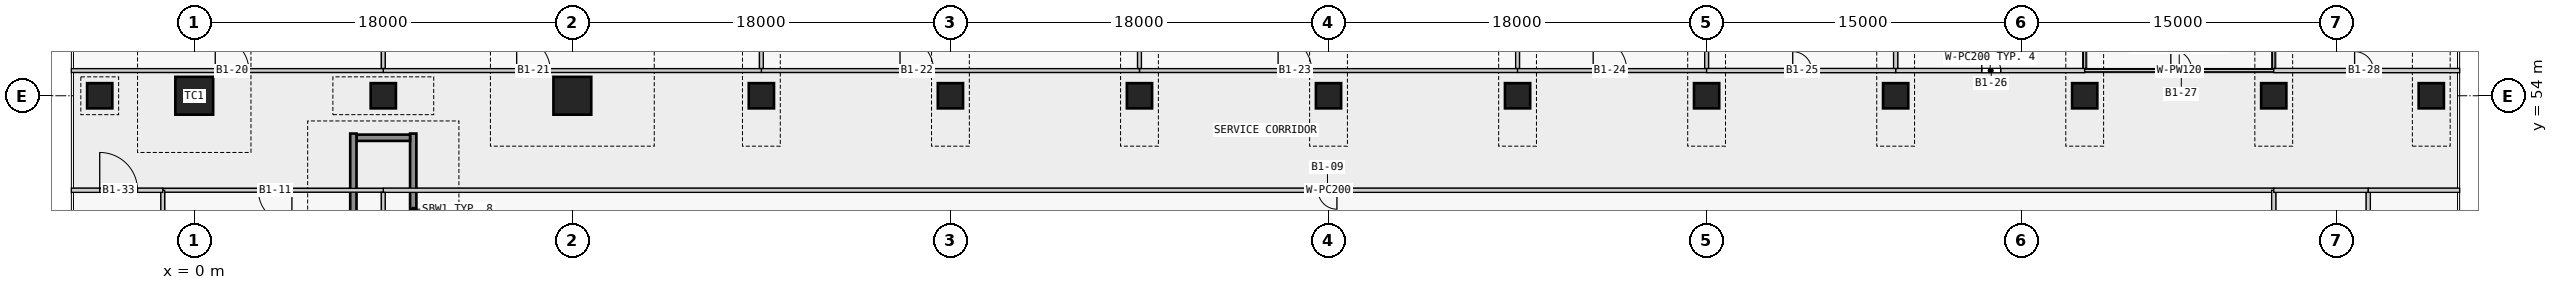
"""IFC4 building model, lengths in metres.
Left out: names, types, materials, properties, quantities, classifications, styles, units other than length and angle.
Written with IfcOpenShell. Run it as: python <this file> out.ifc"""

import sys

from ifc_helpers import new_model, si_unit, direction, frame, frame_2d, origin, origin_2d, place, context, subcontext, project, spatial, rectangle, extrude, element, fill, save


model = new_model("IFC4")
c1 = context("Model", 3, precision=1e-05, world=origin(), true_north=direction((0.0, 1.0)))
c2 = subcontext(c1, "Body", "Model", "MODEL_VIEW")
j1 = project(units=[si_unit("LENGTHUNIT", "METRE"), si_unit("PLANEANGLEUNIT", "RADIAN")], contexts=[c1])
p1 = place(None, origin())
s1 = spatial("IfcSite", under=j1, at=p1, CompositionType="ELEMENT")
p2 = place(p1, origin())
s2 = spatial("IfcBuilding", under=s1, at=p2, CompositionType="ELEMENT")
p3 = place(p2, frame((0.0, 0.0, -7.0)))
s3 = spatial("IfcBuildingStorey", under=s2, at=p3, CompositionType="ELEMENT", Elevation=-7.0)
p4 = place(p3, frame((-4.5, 54.0, 0.0), z_axis=(0.0, 0.0, 1.0), x_axis=(1.0, 0.0, 0.0)))
e1 = element("IfcColumn", 1, at=p4, inside=s3, PredefinedType="COLUMN", context=c2, shape_type="SweptSolid", body=[
    extrude(rectangle(XDim=1.2, YDim=1.2, at=origin_2d()), origin(), (0.0, 0.0, 1.0), 7.0),
])
p5 = place(p3, frame((0.0, 54.0, 0.0), z_axis=(0.0, 0.0, 1.0), x_axis=(1.0, 0.0, 0.0)))
e2 = element("IfcColumn", 2, at=p5, inside=s3, PredefinedType="COLUMN", context=c2, shape_type="SweptSolid", body=[
    extrude(rectangle(XDim=1.8, YDim=1.8, at=origin_2d()), origin(), (0.0, 0.0, 1.0), 7.0),
])
p6 = place(p3, frame((9.0, 54.0, 0.0), z_axis=(0.0, 0.0, 1.0), x_axis=(1.0, 0.0, 0.0)))
e3 = element("IfcColumn", 3, at=p6, inside=s3, PredefinedType="COLUMN", context=c2, shape_type="SweptSolid", body=[
    extrude(rectangle(XDim=1.2, YDim=1.2, at=origin_2d()), origin(), (0.0, 0.0, 1.0), 7.0),
])
p7 = place(p3, frame((18.0, 54.0, 0.0), z_axis=(0.0, 0.0, 1.0), x_axis=(1.0, 0.0, 0.0)))
e4 = element("IfcColumn", 4, at=p7, inside=s3, PredefinedType="COLUMN", context=c2, shape_type="SweptSolid", body=[
    extrude(rectangle(XDim=1.8, YDim=1.8, at=origin_2d()), origin(), (0.0, 0.0, 1.0), 7.0),
])
for number, where, z_axis, x_axis in (
    (5, (27.0, 54.0, 0.0), (0.0, 0.0, 1.0), (1.0, 0.0, 0.0)),
    (6, (36.0, 54.0, 0.0), (0.0, 0.0, 1.0), (1.0, 0.0, 0.0)),
    (7, (45.0, 54.0, 0.0), (0.0, 0.0, 1.0), (1.0, 0.0, 0.0)),
    (8, (54.0, 54.0, 0.0), (0.0, 0.0, 1.0), (1.0, 0.0, 0.0)),
    (9, (63.0, 54.0, 0.0), (0.0, 0.0, 1.0), (1.0, 0.0, 0.0)),
    (10, (72.0, 54.0, 0.0), (0.0, 0.0, 1.0), (1.0, 0.0, 0.0)),
    (11, (81.0, 54.0, 0.0), (0.0, 0.0, 1.0), (1.0, 0.0, 0.0)),
    (12, (90.0, 54.0, 0.0), (0.0, 0.0, 1.0), (1.0, 0.0, 0.0)),
    (13, (99.0, 54.0, 0.0), (0.0, 0.0, 1.0), (1.0, 0.0, 0.0)),
    (14, (106.5, 54.0, 0.0), (0.0, 0.0, 1.0), (1.0, 0.0, 0.0)),
):
    element("IfcColumn", number, at=place(p3, frame(where, z_axis=z_axis, x_axis=x_axis)), inside=s3, PredefinedType="COLUMN", context=c2, shape_type="SweptSolid", body=[
        extrude(rectangle(XDim=1.2, YDim=1.2, at=origin_2d()), origin(), (0.0, 0.0, 1.0), 7.0),
    ])
p8 = place(p3, frame((7.725, 52.0, 0.0), z_axis=(0.0, 0.0, 1.0), x_axis=(1.0, 0.0, 0.0)))
e15 = element("IfcWall", 15, at=p8, inside=s3, PredefinedType="SHEAR", context=c2, shape_type="SweptSolid", body=[
    extrude(rectangle(XDim=2.55, YDim=0.3, at=frame_2d((1.275, 0.0))), origin(), (0.0, 0.0, 1.0), 6.55),
])
for number, where, z_axis, x_axis in (
    (16, (7.575, 45.0, 0.0), (0.0, 0.0, 1.0), (0.0, 1.0, 0.0)),
    (17, (10.425, 45.0, 0.0), (0.0, 0.0, 1.0), (0.0, 1.0, 0.0)),
):
    element("IfcWall", number, at=place(p3, frame(where, z_axis=z_axis, x_axis=x_axis)), inside=s3, PredefinedType="SHEAR", context=c2, shape_type="SweptSolid", body=[
        extrude(rectangle(XDim=7.2, YDim=0.3, at=frame_2d((3.6, 0.0))), origin(), (0.0, 0.0, 1.0), 6.55),
    ])
p9 = place(p3, frame((99.0, 49.5, 0.0), z_axis=(0.0, 0.0, 1.0), x_axis=(-1.0, 0.0, 0.0)))
e18 = element("IfcWall", 18, at=p9, inside=s3, PredefinedType="PARTITIONING", context=c2, shape_type="SweptSolid", body=[
    extrude(rectangle(XDim=90.0, YDim=0.2, at=frame_2d((45.0, 0.0))), origin(), (0.0, 0.0, 1.0), 6.55),
])
p10 = place(p9, frame((44.6, 0.0, 0.0)))
e19 = element("IfcOpeningElement", 19, at=p10, cuts=e18, PredefinedType="OPENING", context=c2, shape_type="SweptSolid", body=[
    extrude(rectangle(XDim=0.9, YDim=2.1, at=frame_2d((0.45, 1.05))), frame((0.0, 0.11, 0.0), z_axis=(0.0, -1.0, 0.0), x_axis=(1.0, 0.0, 0.0)), (0.0, 0.0, 1.0), 0.22),
])
p11 = place(p3, frame((45.0, 55.2, 0.0), z_axis=(0.0, 0.0, 1.0), x_axis=(1.0, 0.0, 0.0)))
e20 = element("IfcWall", 20, at=p11, inside=s3, PredefinedType="PARTITIONING", context=c2, shape_type="SweptSolid", body=[
    extrude(rectangle(XDim=18.0, YDim=0.18, at=frame_2d((9.0, 0.0))), origin(), (0.0, 0.0, 1.0), 6.55),
])
p12 = place(p11, frame((6.6, 0.0, 0.0)))
e21 = element("IfcOpeningElement", 21, at=p12, cuts=e20, PredefinedType="OPENING", context=c2, shape_type="SweptSolid", body=[
    extrude(rectangle(XDim=1.6, YDim=2.4, at=frame_2d((0.8, 1.2))), frame((0.0, 0.1, 0.0), z_axis=(0.0, -1.0, 0.0), x_axis=(1.0, 0.0, 0.0)), (0.0, 0.0, 1.0), 0.2),
])
p13 = place(p3, frame((27.0, 55.2, 0.0), z_axis=(0.0, 0.0, 1.0), x_axis=(1.0, 0.0, 0.0)))
e22 = element("IfcWall", 22, at=p13, inside=s3, PredefinedType="PARTITIONING", context=c2, shape_type="SweptSolid", body=[
    extrude(rectangle(XDim=18.0, YDim=0.18, at=frame_2d((9.0, 0.0))), origin(), (0.0, 0.0, 1.0), 6.55),
])
p14 = place(p13, frame((6.6, 0.0, 0.0)))
e23 = element("IfcOpeningElement", 23, at=p14, cuts=e22, PredefinedType="OPENING", context=c2, shape_type="SweptSolid", body=[
    extrude(rectangle(XDim=1.6, YDim=2.4, at=frame_2d((0.8, 1.2))), frame((0.0, 0.1, 0.0), z_axis=(0.0, -1.0, 0.0), x_axis=(1.0, 0.0, 0.0)), (0.0, 0.0, 1.0), 0.2),
])
p15 = place(p3, frame((9.0, 55.2, 0.0), z_axis=(0.0, 0.0, 1.0), x_axis=(1.0, 0.0, 0.0)))
e24 = element("IfcWall", 24, at=p15, inside=s3, PredefinedType="PARTITIONING", context=c2, shape_type="SweptSolid", body=[
    extrude(rectangle(XDim=18.0, YDim=0.18, at=frame_2d((9.0, 0.0))), origin(), (0.0, 0.0, 1.0), 6.55),
])
p16 = place(p15, frame((6.35, 0.0, 0.0)))
e25 = element("IfcOpeningElement", 25, at=p16, cuts=e24, PredefinedType="OPENING", context=c2, shape_type="SweptSolid", body=[
    extrude(rectangle(XDim=1.6, YDim=2.4, at=frame_2d((0.8, 1.2))), frame((0.0, 0.1, 0.0), z_axis=(0.0, -1.0, 0.0), x_axis=(1.0, 0.0, 0.0)), (0.0, 0.0, 1.0), 0.2),
])
p17 = place(p3, frame((-5.85, 55.2, 0.0), z_axis=(0.0, 0.0, 1.0), x_axis=(1.0, 0.0, 0.0)))
e26 = element("IfcWall", 26, at=p17, inside=s3, PredefinedType="PARTITIONING", context=c2, shape_type="SweptSolid", body=[
    extrude(rectangle(XDim=14.85, YDim=0.18, at=frame_2d((7.425, 0.0))), origin(), (0.0, 0.0, 1.0), 6.55),
])
p18 = place(p17, frame((6.85, 0.0, 0.0)))
e27 = element("IfcOpeningElement", 27, at=p18, cuts=e26, PredefinedType="OPENING", context=c2, shape_type="SweptSolid", body=[
    extrude(rectangle(XDim=1.6, YDim=2.4, at=frame_2d((0.8, 1.2))), frame((0.0, 0.1, 0.0), z_axis=(0.0, -1.0, 0.0), x_axis=(1.0, 0.0, 0.0)), (0.0, 0.0, 1.0), 0.2),
])
p19 = place(p3, frame((9.0, 49.5, 0.0), z_axis=(0.0, 0.0, 1.0), x_axis=(-1.0, 0.0, 0.0)))
e28 = element("IfcWall", 28, at=p19, inside=s3, PredefinedType="PARTITIONING", context=c2, shape_type="SweptSolid", body=[
    extrude(rectangle(XDim=10.5, YDim=0.18, at=frame_2d((5.25, 0.0))), origin(), (0.0, 0.0, 1.0), 6.55),
])
p20 = place(p19, frame((4.35, 0.0, 0.0)))
e29 = element("IfcOpeningElement", 29, at=p20, cuts=e28, PredefinedType="OPENING", context=c2, shape_type="SweptSolid", body=[
    extrude(rectangle(XDim=1.6, YDim=2.4, at=frame_2d((0.8, 1.2))), frame((0.0, 0.1, 0.0), z_axis=(0.0, -1.0, 0.0), x_axis=(1.0, 0.0, 0.0)), (0.0, 0.0, 1.0), 0.2),
])
p21 = place(p3, frame((99.0, 49.5, 0.0), z_axis=(0.0, 0.0, 1.0), x_axis=(0.0, -1.0, 0.0)))
e30 = element("IfcWall", 30, at=p21, inside=s3, PredefinedType="PARTITIONING", context=c2, shape_type="SweptSolid", body=[
    extrude(rectangle(XDim=3.8, YDim=0.2, at=frame_2d((1.9, 0.0))), origin(), (0.0, 0.0, 1.0), 6.55),
])
p22 = place(p3, frame((81.0, 55.2, 0.0), z_axis=(0.0, 0.0, 1.0), x_axis=(1.0, 0.0, 0.0)))
e31 = element("IfcWall", 31, at=p22, inside=s3, PredefinedType="PARTITIONING", context=c2, shape_type="SweptSolid", body=[
    extrude(rectangle(XDim=9.0, YDim=0.2, at=frame_2d((4.5, 0.0))), origin(), (0.0, 0.0, 1.0), 6.55),
])
p23 = place(p22, frame((4.1, 0.0, 0.0)))
e32 = element("IfcOpeningElement", 32, at=p23, cuts=e31, PredefinedType="OPENING", context=c2, shape_type="SweptSolid", body=[
    extrude(rectangle(XDim=0.9, YDim=2.1, at=frame_2d((0.45, 1.05))), frame((0.0, 0.11, 0.0), z_axis=(0.0, -1.0, 0.0), x_axis=(1.0, 0.0, 0.0)), (0.0, 0.0, 1.0), 0.22),
])
p24 = place(p3, frame((63.0, 55.2, 0.0), z_axis=(0.0, 0.0, 1.0), x_axis=(1.0, 0.0, 0.0)))
e33 = element("IfcWall", 33, at=p24, inside=s3, PredefinedType="PARTITIONING", context=c2, shape_type="SweptSolid", body=[
    extrude(rectangle(XDim=9.0, YDim=0.18, at=frame_2d((4.5, 0.0))), origin(), (0.0, 0.0, 1.0), 6.55),
])
p25 = place(p24, frame((3.6, 0.0, 0.0)))
e34 = element("IfcOpeningElement", 34, at=p25, cuts=e33, PredefinedType="OPENING", context=c2, shape_type="SweptSolid", body=[
    extrude(rectangle(XDim=1.6, YDim=2.4, at=frame_2d((0.8, 1.2))), frame((0.0, 0.1, 0.0), z_axis=(0.0, -1.0, 0.0), x_axis=(1.0, 0.0, 0.0)), (0.0, 0.0, 1.0), 0.2),
])
p26 = place(p3, frame((90.0, 55.2, 0.0), z_axis=(0.0, 0.0, 1.0), x_axis=(1.0, 0.0, 0.0)))
e35 = element("IfcWall", 35, at=p26, inside=s3, PredefinedType="PARTITIONING", context=c2, shape_type="SweptSolid", body=[
    extrude(rectangle(XDim=9.0, YDim=0.12, at=frame_2d((4.5, 0.0))), origin(), (0.0, 0.0, 1.0), 6.55),
])
p27 = place(p26, frame((4.1, 0.0, 0.0)))
e36 = element("IfcOpeningElement", 36, at=p27, cuts=e35, PredefinedType="OPENING", context=c2, shape_type="SweptSolid", body=[
    extrude(rectangle(XDim=1.0, YDim=2.1, at=frame_2d((0.5, 1.05))), frame((0.0, 0.07, 0.0), z_axis=(0.0, -1.0, 0.0), x_axis=(1.0, 0.0, 0.0)), (0.0, 0.0, 1.0), 0.14),
])
p28 = place(p3, frame((72.0, 55.2, 0.0), z_axis=(0.0, 0.0, 1.0), x_axis=(1.0, 0.0, 0.0)))
e37 = element("IfcWall", 37, at=p28, inside=s3, PredefinedType="PARTITIONING", context=c2, shape_type="SweptSolid", body=[
    extrude(rectangle(XDim=9.0, YDim=0.2, at=frame_2d((4.5, 0.0))), origin(), (0.0, 0.0, 1.0), 6.55),
])
p29 = place(p28, frame((4.1, 0.0, 0.0)))
e38 = element("IfcOpeningElement", 38, at=p29, cuts=e37, PredefinedType="OPENING", context=c2, shape_type="SweptSolid", body=[
    extrude(rectangle(XDim=0.9, YDim=2.1, at=frame_2d((0.45, 1.05))), frame((0.0, 0.11, 0.0), z_axis=(0.0, -1.0, 0.0), x_axis=(1.0, 0.0, 0.0)), (0.0, 0.0, 1.0), 0.22),
])
p30 = place(p3, frame((-1.5, 49.5, 0.0), z_axis=(0.0, 0.0, 1.0), x_axis=(0.0, -1.0, 0.0)))
e39 = element("IfcWall", 39, at=p30, inside=s3, PredefinedType="PARTITIONING", context=c2, shape_type="SweptSolid", body=[
    extrude(rectangle(XDim=9.0, YDim=0.18, at=frame_2d((4.5, 0.0))), origin(), (0.0, 0.0, 1.0), 6.55),
])
p31 = place(p3, frame((9.0, 40.6, 0.0), z_axis=(0.0, 0.0, 1.0), x_axis=(0.0, 1.0, 0.0)))
e40 = element("IfcWall", 40, at=p31, inside=s3, PredefinedType="PARTITIONING", context=c2, shape_type="SweptSolid", body=[
    extrude(rectangle(XDim=8.8, YDim=0.18, at=frame_2d((4.4, 0.0))), origin(), (0.0, 0.0, 1.0), 6.55),
])
p32 = place(p3, frame((103.5, 40.5, 0.0), z_axis=(0.0, 0.0, 1.0), x_axis=(0.0, 1.0, 0.0)))
e41 = element("IfcWall", 41, at=p32, inside=s3, PredefinedType="PARTITIONING", context=c2, shape_type="SweptSolid", body=[
    extrude(rectangle(XDim=9.0, YDim=0.2, at=frame_2d((4.5, 0.0))), origin(), (0.0, 0.0, 1.0), 6.55),
])
p33 = place(p32, frame((4.1, 0.0, 0.0)))
e42 = element("IfcOpeningElement", 42, at=p33, cuts=e41, PredefinedType="OPENING", context=c2, shape_type="SweptSolid", body=[
    extrude(rectangle(XDim=0.9, YDim=2.1, at=frame_2d((0.45, 1.05))), frame((0.0, 0.11, 0.0), z_axis=(0.0, -1.0, 0.0), x_axis=(1.0, 0.0, 0.0)), (0.0, 0.0, 1.0), 0.22),
])
p34 = place(p3, frame((99.0, 55.2, 0.0), z_axis=(0.0, 0.0, 1.0), x_axis=(1.0, 0.0, 0.0)))
e43 = element("IfcWall", 43, at=p34, inside=s3, PredefinedType="PARTITIONING", context=c2, shape_type="SweptSolid", body=[
    extrude(rectangle(XDim=8.85, YDim=0.2, at=frame_2d((4.425, 0.0))), origin(), (0.0, 0.0, 1.0), 6.55),
])
p35 = place(p34, frame((3.85, 0.0, 0.0)))
e44 = element("IfcOpeningElement", 44, at=p35, cuts=e43, PredefinedType="OPENING", context=c2, shape_type="SweptSolid", body=[
    extrude(rectangle(XDim=0.9, YDim=2.1, at=frame_2d((0.45, 1.05))), frame((0.0, 0.11, 0.0), z_axis=(0.0, -1.0, 0.0), x_axis=(1.0, 0.0, 0.0)), (0.0, 0.0, 1.0), 0.22),
])
p36 = place(p3, frame((63.0, 57.8, 0.0), z_axis=(0.0, 0.0, 1.0), x_axis=(0.0, -1.0, 0.0)))
e45 = element("IfcWall", 45, at=p36, inside=s3, PredefinedType="PARTITIONING", context=c2, shape_type="SweptSolid", body=[
    extrude(rectangle(XDim=2.5, YDim=0.18, at=frame_2d((1.25, 0.0))), origin(), (0.0, 0.0, 1.0), 6.55),
])
p37 = place(p3, frame((90.0, 57.8, 0.0), z_axis=(0.0, 0.0, 1.0), x_axis=(0.0, -1.0, 0.0)))
e46 = element("IfcWall", 46, at=p37, inside=s3, PredefinedType="PARTITIONING", context=c2, shape_type="SweptSolid", body=[
    extrude(rectangle(XDim=2.5, YDim=0.12, at=frame_2d((1.25, 0.0))), origin(), (0.0, 0.0, 1.0), 6.55),
])
p38 = place(p3, frame((45.0, 57.8, 0.0), z_axis=(0.0, 0.0, 1.0), x_axis=(0.0, -1.0, 0.0)))
e47 = element("IfcWall", 47, at=p38, inside=s3, PredefinedType="PARTITIONING", context=c2, shape_type="SweptSolid", body=[
    extrude(rectangle(XDim=2.5, YDim=0.18, at=frame_2d((1.25, 0.0))), origin(), (0.0, 0.0, 1.0), 6.55),
])
p39 = place(p3, frame((81.0, 57.8, 0.0), z_axis=(0.0, 0.0, 1.0), x_axis=(0.0, -1.0, 0.0)))
e48 = element("IfcWall", 48, at=p39, inside=s3, PredefinedType="PARTITIONING", context=c2, shape_type="SweptSolid", body=[
    extrude(rectangle(XDim=2.5, YDim=0.2, at=frame_2d((1.25, 0.0))), origin(), (0.0, 0.0, 1.0), 6.55),
])
for number, where, z_axis, x_axis in (
    (49, (27.0, 57.8, 0.0), (0.0, 0.0, 1.0), (0.0, -1.0, 0.0)),
    (50, (9.0, 57.8, 0.0), (0.0, 0.0, 1.0), (0.0, -1.0, 0.0)),
):
    element("IfcWall", number, at=place(p3, frame(where, z_axis=z_axis, x_axis=x_axis)), inside=s3, PredefinedType="PARTITIONING", context=c2, shape_type="SweptSolid", body=[
        extrude(rectangle(XDim=2.5, YDim=0.18, at=frame_2d((1.25, 0.0))), origin(), (0.0, 0.0, 1.0), 6.55),
    ])
p40 = place(p3, frame((99.0, 57.8, 0.0), z_axis=(0.0, 0.0, 1.0), x_axis=(0.0, -1.0, 0.0)))
e51 = element("IfcWall", 51, at=p40, inside=s3, PredefinedType="PARTITIONING", context=c2, shape_type="SweptSolid", body=[
    extrude(rectangle(XDim=2.5, YDim=0.12, at=frame_2d((1.25, 0.0))), origin(), (0.0, 0.0, 1.0), 6.55),
])
p41 = place(p3, frame((72.0, 57.8, 0.0), z_axis=(0.0, 0.0, 1.0), x_axis=(0.0, -1.0, 0.0)))
e52 = element("IfcWall", 52, at=p41, inside=s3, PredefinedType="PARTITIONING", context=c2, shape_type="SweptSolid", body=[
    extrude(rectangle(XDim=2.5, YDim=0.18, at=frame_2d((1.25, 0.0))), origin(), (0.0, 0.0, 1.0), 6.55),
])
p42 = place(p3, frame((103.5, 49.5, 0.0), z_axis=(0.0, 0.0, 1.0), x_axis=(-1.0, 0.0, 0.0)))
e53 = element("IfcWall", 53, at=p42, inside=s3, PredefinedType="PARTITIONING", context=c2, shape_type="SweptSolid", body=[
    extrude(rectangle(XDim=4.5, YDim=0.2, at=frame_2d((2.25, 0.0))), origin(), (0.0, 0.0, 1.0), 6.55),
])
p43 = place(p3, frame((-5.85, 49.5, 0.0), z_axis=(0.0, 0.0, 1.0), x_axis=(1.0, 0.0, 0.0)))
e54 = element("IfcWall", 54, at=p43, inside=s3, PredefinedType="PARTITIONING", context=c2, shape_type="SweptSolid", body=[
    extrude(rectangle(XDim=4.35, YDim=0.2, at=frame_2d((2.175, 0.0))), origin(), (0.0, 0.0, 1.0), 6.55),
])
p44 = place(p43, frame((1.35, 0.0, 0.0)))
e55 = element("IfcOpeningElement", 55, at=p44, cuts=e54, PredefinedType="OPENING", context=c2, shape_type="SweptSolid", body=[
    extrude(rectangle(XDim=1.8, YDim=2.1, at=frame_2d((0.9, 1.05))), frame((0.0, 0.11, 0.0), z_axis=(0.0, -1.0, 0.0), x_axis=(1.0, 0.0, 0.0)), (0.0, 0.0, 1.0), 0.22),
])
p45 = place(p3, frame((103.5, 49.5, 0.0), z_axis=(0.0, 0.0, 1.0), x_axis=(1.0, 0.0, 0.0)))
e56 = element("IfcWall", 56, at=p45, inside=s3, PredefinedType="PARTITIONING", context=c2, shape_type="SweptSolid", body=[
    extrude(rectangle(XDim=4.35, YDim=0.2, at=frame_2d((2.175, 0.0))), origin(), (0.0, 0.0, 1.0), 6.55),
])
p46 = place(p10, origin())
e57 = element("IfcDoor", 57, at=p46, inside=s3, OperationType="SINGLE_SWING_LEFT", PredefinedType="DOOR", context=c2, shape_type="SweptSolid", body=[
    extrude(rectangle(XDim=0.9, YDim=2.1, at=frame_2d((0.45, 1.05))), frame((0.0, 0.025, 0.0), z_axis=(0.0, -1.0, 0.0), x_axis=(1.0, 0.0, 0.0)), (0.0, 0.0, 1.0), 0.05),
])
fill(e19, e57)
p47 = place(p20, origin())
e58 = element("IfcDoor", 58, at=p47, inside=s3, OperationType="SINGLE_SWING_LEFT", PredefinedType="DOOR", context=c2, shape_type="SweptSolid", body=[
    extrude(rectangle(XDim=1.6, YDim=2.4, at=frame_2d((0.8, 1.2))), frame((0.0, 0.025, 0.0), z_axis=(0.0, -1.0, 0.0), x_axis=(1.0, 0.0, 0.0)), (0.0, 0.0, 1.0), 0.05),
])
fill(e29, e58)
p48 = place(p18, origin())
e59 = element("IfcDoor", 59, at=p48, inside=s3, OperationType="SINGLE_SWING_LEFT", PredefinedType="DOOR", context=c2, shape_type="SweptSolid", body=[
    extrude(rectangle(XDim=1.6, YDim=2.4, at=frame_2d((0.8, 1.2))), frame((0.0, 0.025, 0.0), z_axis=(0.0, -1.0, 0.0), x_axis=(1.0, 0.0, 0.0)), (0.0, 0.0, 1.0), 0.05),
])
fill(e27, e59)
p49 = place(p16, origin())
e60 = element("IfcDoor", 60, at=p49, inside=s3, OperationType="SINGLE_SWING_LEFT", PredefinedType="DOOR", context=c2, shape_type="SweptSolid", body=[
    extrude(rectangle(XDim=1.6, YDim=2.4, at=frame_2d((0.8, 1.2))), frame((0.0, 0.025, 0.0), z_axis=(0.0, -1.0, 0.0), x_axis=(1.0, 0.0, 0.0)), (0.0, 0.0, 1.0), 0.05),
])
fill(e25, e60)
p50 = place(p14, origin())
e61 = element("IfcDoor", 61, at=p50, inside=s3, OperationType="SINGLE_SWING_LEFT", PredefinedType="DOOR", context=c2, shape_type="SweptSolid", body=[
    extrude(rectangle(XDim=1.6, YDim=2.4, at=frame_2d((0.8, 1.2))), frame((0.0, 0.025, 0.0), z_axis=(0.0, -1.0, 0.0), x_axis=(1.0, 0.0, 0.0)), (0.0, 0.0, 1.0), 0.05),
])
fill(e23, e61)
p51 = place(p12, origin())
e62 = element("IfcDoor", 62, at=p51, inside=s3, OperationType="SINGLE_SWING_LEFT", PredefinedType="DOOR", context=c2, shape_type="SweptSolid", body=[
    extrude(rectangle(XDim=1.6, YDim=2.4, at=frame_2d((0.8, 1.2))), frame((0.0, 0.025, 0.0), z_axis=(0.0, -1.0, 0.0), x_axis=(1.0, 0.0, 0.0)), (0.0, 0.0, 1.0), 0.05),
])
fill(e21, e62)
p52 = place(p25, origin())
e63 = element("IfcDoor", 63, at=p52, inside=s3, OperationType="SINGLE_SWING_LEFT", PredefinedType="DOOR", context=c2, shape_type="SweptSolid", body=[
    extrude(rectangle(XDim=1.6, YDim=2.4, at=frame_2d((0.8, 1.2))), frame((0.0, 0.025, 0.0), z_axis=(0.0, -1.0, 0.0), x_axis=(1.0, 0.0, 0.0)), (0.0, 0.0, 1.0), 0.05),
])
fill(e34, e63)
p53 = place(p29, origin())
e64 = element("IfcDoor", 64, at=p53, inside=s3, OperationType="SINGLE_SWING_LEFT", PredefinedType="DOOR", context=c2, shape_type="SweptSolid", body=[
    extrude(rectangle(XDim=0.9, YDim=2.1, at=frame_2d((0.45, 1.05))), frame((0.0, 0.025, 0.0), z_axis=(0.0, -1.0, 0.0), x_axis=(1.0, 0.0, 0.0)), (0.0, 0.0, 1.0), 0.05),
])
fill(e38, e64)
p54 = place(p23, origin())
e65 = element("IfcDoor", 65, at=p54, inside=s3, OperationType="SINGLE_SWING_LEFT", PredefinedType="DOOR", context=c2, shape_type="SweptSolid", body=[
    extrude(rectangle(XDim=0.9, YDim=2.1, at=frame_2d((0.45, 1.05))), frame((0.0, 0.025, 0.0), z_axis=(0.0, -1.0, 0.0), x_axis=(1.0, 0.0, 0.0)), (0.0, 0.0, 1.0), 0.05),
])
fill(e32, e65)
p55 = place(p27, origin())
e66 = element("IfcDoor", 66, at=p55, inside=s3, OperationType="SINGLE_SWING_LEFT", PredefinedType="DOOR", context=c2, shape_type="SweptSolid", body=[
    extrude(rectangle(XDim=1.0, YDim=2.1, at=frame_2d((0.5, 1.05))), frame((0.0, 0.025, 0.0), z_axis=(0.0, -1.0, 0.0), x_axis=(1.0, 0.0, 0.0)), (0.0, 0.0, 1.0), 0.05),
])
fill(e36, e66)
p56 = place(p35, origin())
e67 = element("IfcDoor", 67, at=p56, inside=s3, OperationType="SINGLE_SWING_LEFT", PredefinedType="DOOR", context=c2, shape_type="SweptSolid", body=[
    extrude(rectangle(XDim=0.9, YDim=2.1, at=frame_2d((0.45, 1.05))), frame((0.0, 0.025, 0.0), z_axis=(0.0, -1.0, 0.0), x_axis=(1.0, 0.0, 0.0)), (0.0, 0.0, 1.0), 0.05),
])
fill(e44, e67)
p57 = place(p44, origin())
e68 = element("IfcDoor", 68, at=p57, inside=s3, OperationType="DOUBLE_DOOR_SINGLE_SWING", PredefinedType="DOOR", context=c2, shape_type="SweptSolid", body=[
    extrude(rectangle(XDim=1.8, YDim=2.1, at=frame_2d((0.9, 1.05))), frame((0.0, 0.025, 0.0), z_axis=(0.0, -1.0, 0.0), x_axis=(1.0, 0.0, 0.0)), (0.0, 0.0, 1.0), 0.05),
])
fill(e55, e68)
save(model, sys.argv[1])
